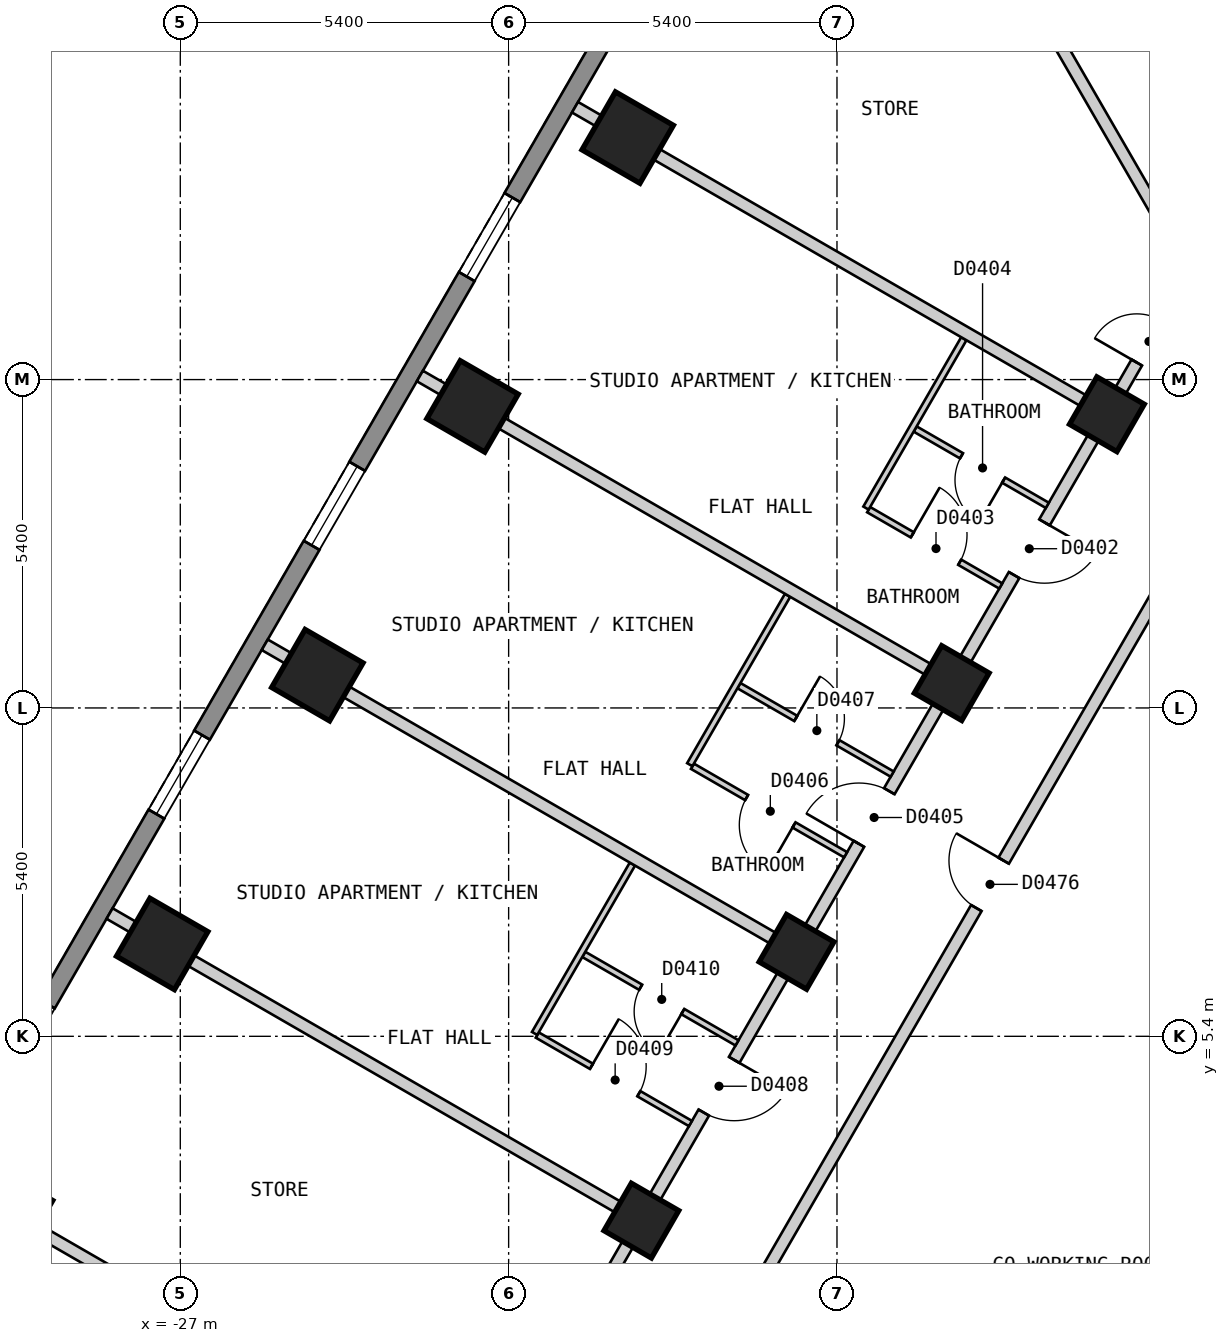
"""IFC4 building model, lengths in metres.
Left out: names, types, materials, properties, quantities, classifications, styles, units other than length and angle.
Written with IfcOpenShell. Run it as: python <this file> out.ifc"""

import sys

from ifc_helpers import new_model, si_unit, direction, frame, frame_2d, origin, origin_2d, place, context, subcontext, project, spatial, polyline, rectangle, outline, extrude, element, fill, save


model = new_model("IFC4")
c1 = context("Model", 3, precision=1e-05, world=origin(), true_north=direction((0.0, 1.0)))
c2 = subcontext(c1, "Body", "Model", "MODEL_VIEW")
j1 = project(units=[si_unit("LENGTHUNIT", "METRE"), si_unit("PLANEANGLEUNIT", "RADIAN")], contexts=[c1])
p1 = place(None, origin())
s1 = spatial("IfcSite", under=j1, at=p1, CompositionType="ELEMENT")
p2 = place(p1, origin())
s2 = spatial("IfcBuilding", under=s1, at=p2, CompositionType="ELEMENT")
p3 = place(p2, frame((0.0, 0.0, 38.4)))
s3 = spatial("IfcBuildingStorey", under=s2, at=p3, CompositionType="ELEMENT", Elevation=38.4)
for number, where, z_axis, x_axis in (
    (1, (-19.642, 20.18, 0.0), (0.0, 0.0, 1.0), (-0.5, -0.866, 0.0)),
    (2, (-22.194, 15.759, 0.0), (0.0, 0.0, 1.0), (-0.5, -0.866, 0.0)),
    (3, (-24.746, 11.339, 0.0), (0.0, 0.0, 1.0), (-0.5, -0.866, 0.0)),
    (4, (-27.298, 6.919, 0.0), (0.0, 0.0, 1.0), (-0.5, -0.866, 0.0)),
    (5, (-29.849, 2.499, 0.0), (0.0, 0.0, 1.0), (-0.5, -0.866, 0.0)),
):
    element("IfcColumn", number, at=place(p3, frame(where, z_axis=z_axis, x_axis=x_axis)), inside=s3, PredefinedType="COLUMN", context=c2, shape_type="SweptSolid", body=[
        extrude(rectangle(XDim=1.1, YDim=1.1, at=origin_2d()), origin(), (0.0, 0.0, 1.0), 3.0),
    ])
for number, where, z_axis, x_axis in (
    (6, (-11.761, 15.63, 0.0), (0.0, 0.0, 1.0), (-0.5, -0.866, 0.0)),
    (7, (-14.313, 11.209, 0.0), (0.0, 0.0, 1.0), (-0.5, -0.866, 0.0)),
    (8, (-16.865, 6.789, 0.0), (0.0, 0.0, 1.0), (-0.5, -0.866, 0.0)),
    (9, (-19.417, 2.369, 0.0), (0.0, 0.0, 1.0), (-0.5, -0.866, 0.0)),
):
    element("IfcColumn", number, at=place(p3, frame(where, z_axis=z_axis, x_axis=x_axis)), inside=s3, PredefinedType="COLUMN", context=c2, shape_type="SweptSolid", body=[
        extrude(rectangle(XDim=0.9, YDim=0.9, at=origin_2d()), origin(), (0.0, 0.0, 1.0), 3.0),
    ])
p4 = place(p3, frame((-17.71, 25.825, 0.0), z_axis=(0.0, 0.0, 1.0), x_axis=(-0.500001938803, -0.866024284413, 0.0)))
e10 = element("IfcWall", 10, at=p4, inside=s3, PredefinedType="SOLIDWALL", context=c2, shape_type="SweptSolid", body=[
    extrude(outline(polyline([(0.0, -0.15), (27.02, -0.15), (26.94, 0.15), (0.08, 0.15), (0.0, -0.15)])), origin(), (0.0, 0.0, 1.0), 2.7),
])
p5 = place(p4, frame((2.553, 0.0, 0.15)))
e11 = element("IfcOpeningElement", 11, at=p5, cuts=e10, PredefinedType="OPENING", context=c2, shape_type="SweptSolid", body=[
    extrude(rectangle(XDim=1.5, YDim=2.1, at=frame_2d((0.75, 1.05))), frame((0.0, 0.16, 0.0), z_axis=(0.0, -1.0, 0.0), x_axis=(1.0, 0.0, 0.0)), (0.0, 0.0, 1.0), 0.32),
])
p6 = place(p4, frame((7.658, 0.0, 0.15)))
e12 = element("IfcOpeningElement", 12, at=p6, cuts=e10, PredefinedType="OPENING", context=c2, shape_type="SweptSolid", body=[
    extrude(rectangle(XDim=1.5, YDim=2.1, at=frame_2d((0.75, 1.05))), frame((0.0, 0.16, 0.0), z_axis=(0.0, -1.0, 0.0), x_axis=(1.0, 0.0, 0.0)), (0.0, 0.0, 1.0), 0.32),
])
p7 = place(p4, frame((12.761, 0.0, 0.15)))
e13 = element("IfcOpeningElement", 13, at=p7, cuts=e10, PredefinedType="OPENING", context=c2, shape_type="SweptSolid", body=[
    extrude(rectangle(XDim=1.5, YDim=2.1, at=frame_2d((0.75, 1.05))), frame((0.0, 0.16, 0.0), z_axis=(0.0, -1.0, 0.0), x_axis=(1.0, 0.0, 0.0)), (0.0, 0.0, 1.0), 0.32),
])
p8 = place(p4, frame((17.865, 0.0, 0.15)))
e14 = element("IfcOpeningElement", 14, at=p8, cuts=e10, PredefinedType="OPENING", context=c2, shape_type="SweptSolid", body=[
    extrude(rectangle(XDim=1.5, YDim=2.1, at=frame_2d((0.75, 1.05))), frame((0.0, 0.16, 0.0), z_axis=(0.0, -1.0, 0.0), x_axis=(1.0, 0.0, 0.0)), (0.0, 0.0, 1.0), 0.32),
])
p9 = place(p4, frame((22.969, 0.0, 0.15)))
e15 = element("IfcOpeningElement", 15, at=p9, cuts=e10, PredefinedType="OPENING", context=c2, shape_type="SweptSolid", body=[
    extrude(rectangle(XDim=1.5, YDim=2.1, at=frame_2d((0.75, 1.05))), frame((0.0, 0.16, 0.0), z_axis=(0.0, -1.0, 0.0), x_axis=(1.0, 0.0, 0.0)), (0.0, 0.0, 1.0), 0.32),
])
p10 = place(p3, frame((-18.244, -0.001, 0.0), z_axis=(0.0, 0.0, 1.0), x_axis=(0.499962999376, 0.866046765051, 0.0)))
e16 = element("IfcWall", 16, at=p10, inside=s3, PredefinedType="PARTITIONING", context=c2, shape_type="SweptSolid", body=[
    extrude(rectangle(XDim=18.245, YDim=0.2, at=frame_2d((9.123, 0.0))), origin(), (0.0, 0.0, 1.0), 2.7),
])
p11 = place(p10, frame((8.672, 0.0, 0.0)))
e17 = element("IfcOpeningElement", 17, at=p11, cuts=e16, PredefinedType="OPENING", context=c2, shape_type="SweptSolid", body=[
    extrude(rectangle(XDim=0.9, YDim=2.1, at=frame_2d((0.45, 1.05))), frame((0.0, 0.11, 0.0), z_axis=(0.0, -1.0, 0.0), x_axis=(1.0, 0.0, 0.0)), (0.0, 0.0, 1.0), 0.22),
])
p12 = place(p3, frame((-20.727, 0.099, 0.0), z_axis=(0.0, 0.0, 1.0), x_axis=(0.499993204491, 0.866029327138, 0.0)))
e18 = element("IfcWall", 18, at=p12, inside=s3, PredefinedType="PARTITIONING", context=c2, shape_type="SweptSolid", body=[
    extrude(rectangle(XDim=20.554, YDim=0.2, at=frame_2d((10.277, 0.0))), origin(), (0.0, 0.0, 1.0), 2.7),
])
p13 = place(p12, frame((18.916, 0.0, 0.0)))
e19 = element("IfcOpeningElement", 19, at=p13, cuts=e18, PredefinedType="OPENING", context=c2, shape_type="SweptSolid", body=[
    extrude(rectangle(XDim=0.8, YDim=2.1, at=frame_2d((0.4, 1.05))), frame((0.0, 0.11, 0.0), z_axis=(0.0, -1.0, 0.0), x_axis=(1.0, 0.0, 0.0)), (0.0, 0.0, 1.0), 0.22),
])
p14 = place(p12, frame((14.88, 0.0, 0.0)))
e20 = element("IfcOpeningElement", 20, at=p14, cuts=e18, PredefinedType="OPENING", context=c2, shape_type="SweptSolid", body=[
    extrude(rectangle(XDim=1.0, YDim=2.1, at=frame_2d((0.5, 1.05))), frame((0.0, 0.11, 0.0), z_axis=(0.0, -1.0, 0.0), x_axis=(1.0, 0.0, 0.0)), (0.0, 0.0, 1.0), 0.22),
])
p15 = place(p12, frame((9.776, 0.0, 0.0)))
e21 = element("IfcOpeningElement", 21, at=p15, cuts=e18, PredefinedType="OPENING", context=c2, shape_type="SweptSolid", body=[
    extrude(rectangle(XDim=1.0, YDim=2.1, at=frame_2d((0.5, 1.05))), frame((0.0, 0.11, 0.0), z_axis=(0.0, -1.0, 0.0), x_axis=(1.0, 0.0, 0.0)), (0.0, 0.0, 1.0), 0.22),
])
p16 = place(p12, frame((4.673, 0.0, 0.0)))
e22 = element("IfcOpeningElement", 22, at=p16, cuts=e18, PredefinedType="OPENING", context=c2, shape_type="SweptSolid", body=[
    extrude(rectangle(XDim=1.0, YDim=2.1, at=frame_2d((0.5, 1.05))), frame((0.0, 0.11, 0.0), z_axis=(0.0, -1.0, 0.0), x_axis=(1.0, 0.0, 0.0)), (0.0, 0.0, 1.0), 0.22),
])
p17 = place(p12, frame((0.838, 0.0, 0.0)))
e23 = element("IfcOpeningElement", 23, at=p17, cuts=e18, PredefinedType="OPENING", context=c2, shape_type="SweptSolid", body=[
    extrude(rectangle(XDim=0.8, YDim=2.1, at=frame_2d((0.4, 1.05))), frame((0.0, 0.11, 0.0), z_axis=(0.0, -1.0, 0.0), x_axis=(1.0, 0.0, 0.0)), (0.0, 0.0, 1.0), 0.22),
])
p18 = place(p3, frame((-20.364, 6.747, 0.0), z_axis=(0.0, 0.0, 1.0), x_axis=(0.866003949776, -0.500037157592, 0.0)))
e24 = element("IfcWall", 24, at=p18, inside=s3, PredefinedType="PARTITIONING", context=c2, shape_type="SweptSolid", body=[
    extrude(rectangle(XDim=2.91, YDim=0.1, at=frame_2d((1.455, 0.0))), origin(), (0.0, 0.0, 1.0), 2.7),
])
p19 = place(p18, frame((1.08, 0.0, 0.0)))
e25 = element("IfcOpeningElement", 25, at=p19, cuts=e24, PredefinedType="OPENING", context=c2, shape_type="SweptSolid", body=[
    extrude(rectangle(XDim=0.8, YDim=2.1, at=frame_2d((0.4, 1.05))), frame((0.0, 0.06, 0.0), z_axis=(0.0, -1.0, 0.0), x_axis=(1.0, 0.0, 0.0)), (0.0, 0.0, 1.0), 0.12),
])
p20 = place(p3, frame((-21.129, 5.421, 0.0), z_axis=(0.0, 0.0, 1.0), x_axis=(0.865935355752, -0.500155935342, 0.0)))
e26 = element("IfcWall", 26, at=p20, inside=s3, PredefinedType="PARTITIONING", context=c2, shape_type="SweptSolid", body=[
    extrude(rectangle(XDim=2.909, YDim=0.1, at=frame_2d((1.454, 0.0))), origin(), (0.0, 0.0, 1.0), 2.7),
])
p21 = place(p20, frame((1.029, 0.0, 0.0)))
e27 = element("IfcOpeningElement", 27, at=p21, cuts=e26, PredefinedType="OPENING", context=c2, shape_type="SweptSolid", body=[
    extrude(rectangle(XDim=0.9, YDim=2.1, at=frame_2d((0.45, 1.05))), frame((0.0, 0.06, 0.0), z_axis=(0.0, -1.0, 0.0), x_axis=(1.0, 0.0, 0.0)), (0.0, 0.0, 1.0), 0.12),
])
p22 = place(p3, frame((-18.577, 9.841, 0.0), z_axis=(0.0, 0.0, 1.0), x_axis=(0.865899003441, -0.500218867937, 0.0)))
e28 = element("IfcWall", 28, at=p22, inside=s3, PredefinedType="PARTITIONING", context=c2, shape_type="SweptSolid", body=[
    extrude(rectangle(XDim=2.909, YDim=0.1, at=frame_2d((1.455, 0.0))), origin(), (0.0, 0.0, 1.0), 2.7),
])
p23 = place(p22, frame((1.029, 0.0, 0.0)))
e29 = element("IfcOpeningElement", 29, at=p23, cuts=e28, PredefinedType="OPENING", context=c2, shape_type="SweptSolid", body=[
    extrude(rectangle(XDim=0.9, YDim=2.1, at=frame_2d((0.45, 1.05))), frame((0.0, 0.06, 0.0), z_axis=(0.0, -1.0, 0.0), x_axis=(1.0, 0.0, 0.0)), (0.0, 0.0, 1.0), 0.12),
])
p24 = place(p3, frame((-15.679, 14.061, 0.0), z_axis=(0.0, 0.0, 1.0), x_axis=(0.865916579361, -0.500188442078, 0.0)))
e30 = element("IfcWall", 30, at=p24, inside=s3, PredefinedType="PARTITIONING", context=c2, shape_type="SweptSolid", body=[
    extrude(rectangle(XDim=2.509, YDim=0.1, at=frame_2d((1.255, 0.0))), origin(), (0.0, 0.0, 1.0), 2.7),
])
p25 = place(p24, frame((0.829, 0.0, 0.0)))
e31 = element("IfcOpeningElement", 31, at=p25, cuts=e30, PredefinedType="OPENING", context=c2, shape_type="SweptSolid", body=[
    extrude(rectangle(XDim=0.9, YDim=2.1, at=frame_2d((0.45, 1.05))), frame((0.0, 0.06, 0.0), z_axis=(0.0, -1.0, 0.0), x_axis=(1.0, 0.0, 0.0)), (0.0, 0.0, 1.0), 0.12),
])
p26 = place(p3, frame((-14.914, 15.387, 0.0), z_axis=(0.0, 0.0, 1.0), x_axis=(0.865983051302, -0.500073349477, 0.0)))
e32 = element("IfcWall", 32, at=p26, inside=s3, PredefinedType="PARTITIONING", context=c2, shape_type="SweptSolid", body=[
    extrude(rectangle(XDim=2.509, YDim=0.1, at=frame_2d((1.255, 0.0))), origin(), (0.0, 0.0, 1.0), 2.7),
])
p27 = place(p26, frame((0.88, 0.0, 0.0)))
e33 = element("IfcOpeningElement", 33, at=p27, cuts=e32, PredefinedType="OPENING", context=c2, shape_type="SweptSolid", body=[
    extrude(rectangle(XDim=0.8, YDim=2.1, at=frame_2d((0.4, 1.05))), frame((0.0, 0.06, 0.0), z_axis=(0.0, -1.0, 0.0), x_axis=(1.0, 0.0, 0.0)), (0.0, 0.0, 1.0), 0.12),
])
p28 = place(p3, frame((-17.813, 11.167, 0.0), z_axis=(0.0, 0.0, 1.0), x_axis=(0.866087824531, -0.499891868507, 0.0)))
e34 = element("IfcWall", 34, at=p28, inside=s3, PredefinedType="PARTITIONING", context=c2, shape_type="SweptSolid", body=[
    extrude(rectangle(XDim=2.911, YDim=0.1, at=frame_2d((1.456, 0.0))), origin(), (0.0, 0.0, 1.0), 2.7),
])
p29 = place(p28, frame((1.08, 0.0, 0.0)))
e35 = element("IfcOpeningElement", 35, at=p29, cuts=e34, PredefinedType="OPENING", context=c2, shape_type="SweptSolid", body=[
    extrude(rectangle(XDim=0.8, YDim=2.1, at=frame_2d((0.4, 1.05))), frame((0.0, 0.06, 0.0), z_axis=(0.0, -1.0, 0.0), x_axis=(1.0, 0.0, 0.0)), (0.0, 0.0, 1.0), 0.12),
])
p30 = place(p3, frame((-15.723, 14.087, 0.0), z_axis=(0.0, 0.0, 1.0), x_axis=(0.500204249835, 0.865907447969, 0.0)))
e36 = element("IfcWall", 36, at=p30, inside=s3, PredefinedType="PARTITIONING", context=c2, shape_type="SweptSolid", body=[
    extrude(rectangle(XDim=3.217, YDim=0.1, at=frame_2d((1.608, 0.0))), origin(), (0.0, 0.0, 1.0), 2.7),
])
p31 = place(p3, frame((-21.173, 5.447, 0.0), z_axis=(0.0, 0.0, 1.0), x_axis=(0.500162542782, 0.865931539325, 0.0)))
e37 = element("IfcWall", 37, at=p31, inside=s3, PredefinedType="PARTITIONING", context=c2, shape_type="SweptSolid", body=[
    extrude(rectangle(XDim=3.217, YDim=0.1, at=frame_2d((1.609, 0.0))), origin(), (0.0, 0.0, 1.0), 2.7),
])
p32 = place(p3, frame((-18.621, 9.867, 0.0), z_axis=(0.0, 0.0, 1.0), x_axis=(0.500197891286, 0.865911121047, 0.0)))
e38 = element("IfcWall", 38, at=p32, inside=s3, PredefinedType="PARTITIONING", context=c2, shape_type="SweptSolid", body=[
    extrude(rectangle(XDim=3.215, YDim=0.1, at=frame_2d((1.607, 0.0))), origin(), (0.0, 0.0, 1.0), 2.7),
])
p33 = place(p3, frame((-12.659, 21.926, 0.0), z_axis=(0.0, 0.0, 1.0), x_axis=(0.500025458316, -0.86601070492, 0.0)))
e39 = element("IfcWall", 39, at=p33, inside=s3, PredefinedType="PARTITIONING", context=c2, shape_type="SweptSolid", body=[
    extrude(rectangle(XDim=4.533, YDim=0.2, at=frame_2d((2.267, 0.0))), origin(), (0.0, 0.0, 1.0), 2.7),
])
p34 = place(p3, frame((-28.163, 7.419, 0.0), z_axis=(0.0, 0.0, 1.0), x_axis=(0.866022959057, -0.500004234368, 0.0)))
e40 = element("IfcWall", 40, at=p34, inside=s3, PredefinedType="PARTITIONING", context=c2, shape_type="SweptSolid", body=[
    extrude(rectangle(XDim=10.0, YDim=0.2, at=frame_2d((5.0, 0.0))), origin(), (0.0, 0.0, 1.0), 2.7),
])
p35 = place(p3, frame((-30.716, 2.999, 0.0), z_axis=(0.0, 0.0, 1.0), x_axis=(0.866032775405, -0.499987231761, 0.0)))
e41 = element("IfcWall", 41, at=p35, inside=s3, PredefinedType="PARTITIONING", context=c2, shape_type="SweptSolid", body=[
    extrude(rectangle(XDim=5.8, YDim=0.2, at=frame_2d((2.9, 0.0))), origin(), (0.0, 0.0, 1.0), 2.7),
])
p36 = place(p3, frame((-25.611, 11.839, 0.0), z_axis=(0.0, 0.0, 1.0), x_axis=(0.866022959057, -0.500004234368, 0.0)))
e42 = element("IfcWall", 42, at=p36, inside=s3, PredefinedType="PARTITIONING", context=c2, shape_type="SweptSolid", body=[
    extrude(rectangle(XDim=10.0, YDim=0.2, at=frame_2d((5.0, 0.0))), origin(), (0.0, 0.0, 1.0), 2.7),
])
for number, where, z_axis, x_axis in (
    (43, (-20.508, 20.679, 0.0), (0.0, 0.0, 1.0), (0.866, -0.5, 0.0)),
    (44, (-23.06, 16.259, 0.0), (0.0, 0.0, 1.0), (0.866, -0.5, 0.0)),
):
    element("IfcWall", number, at=place(p3, frame(where, z_axis=z_axis, x_axis=x_axis)), inside=s3, PredefinedType="PARTITIONING", context=c2, shape_type="SweptSolid", body=[
        extrude(rectangle(XDim=10.001, YDim=0.2, at=frame_2d((5.0, 0.0))), origin(), (0.0, 0.0, 1.0), 2.7),
    ])
p37 = place(p6, origin())
e45 = element("IfcWindow", 45, at=p37, inside=s3, PartitioningType="SINGLE_PANEL", PredefinedType="WINDOW", context=c2, shape_type="SweptSolid", body=[
    extrude(rectangle(XDim=1.5, YDim=2.1, at=frame_2d((0.75, 1.05))), frame((0.0, 0.03, 0.0), z_axis=(0.0, -1.0, 0.0), x_axis=(1.0, 0.0, 0.0)), (0.0, 0.0, 1.0), 0.06),
])
fill(e12, e45)
p38 = place(p7, origin())
e46 = element("IfcWindow", 46, at=p38, inside=s3, PartitioningType="SINGLE_PANEL", PredefinedType="WINDOW", context=c2, shape_type="SweptSolid", body=[
    extrude(rectangle(XDim=1.5, YDim=2.1, at=frame_2d((0.75, 1.05))), frame((0.0, 0.03, 0.0), z_axis=(0.0, -1.0, 0.0), x_axis=(1.0, 0.0, 0.0)), (0.0, 0.0, 1.0), 0.06),
])
fill(e13, e46)
p39 = place(p8, origin())
e47 = element("IfcWindow", 47, at=p39, inside=s3, PartitioningType="SINGLE_PANEL", PredefinedType="WINDOW", context=c2, shape_type="SweptSolid", body=[
    extrude(rectangle(XDim=1.5, YDim=2.1, at=frame_2d((0.75, 1.05))), frame((0.0, 0.03, 0.0), z_axis=(0.0, -1.0, 0.0), x_axis=(1.0, 0.0, 0.0)), (0.0, 0.0, 1.0), 0.06),
])
fill(e14, e47)
p40 = place(p13, origin())
e48 = element("IfcDoor", 48, at=p40, inside=s3, OperationType="SINGLE_SWING_LEFT", PredefinedType="DOOR", context=c2, shape_type="SweptSolid", body=[
    extrude(rectangle(XDim=0.8, YDim=2.1, at=frame_2d((0.4, 1.05))), frame((0.0, 0.025, 0.0), z_axis=(0.0, -1.0, 0.0), x_axis=(1.0, 0.0, 0.0)), (0.0, 0.0, 1.0), 0.05),
])
fill(e19, e48)
p41 = place(p14, origin())
e49 = element("IfcDoor", 49, at=p41, inside=s3, OperationType="SINGLE_SWING_RIGHT", PredefinedType="DOOR", context=c2, shape_type="SweptSolid", body=[
    extrude(rectangle(XDim=1.0, YDim=2.1, at=frame_2d((0.5, 1.05))), frame((0.0, 0.025, 0.0), z_axis=(0.0, -1.0, 0.0), x_axis=(1.0, 0.0, 0.0)), (0.0, 0.0, 1.0), 0.05),
])
fill(e20, e49)
p42 = place(p25, origin())
e50 = element("IfcDoor", 50, at=p42, inside=s3, OperationType="SINGLE_SWING_LEFT", PredefinedType="DOOR", context=c2, shape_type="SweptSolid", body=[
    extrude(rectangle(XDim=0.9, YDim=2.1, at=frame_2d((0.45, 1.05))), frame((0.0, 0.025, 0.0), z_axis=(0.0, -1.0, 0.0), x_axis=(1.0, 0.0, 0.0)), (0.0, 0.0, 1.0), 0.05),
])
fill(e31, e50)
p43 = place(p27, origin())
e51 = element("IfcDoor", 51, at=p43, inside=s3, OperationType="SINGLE_SWING_RIGHT", PredefinedType="DOOR", context=c2, shape_type="SweptSolid", body=[
    extrude(rectangle(XDim=0.8, YDim=2.1, at=frame_2d((0.4, 1.05))), frame((0.0, 0.025, 0.0), z_axis=(0.0, -1.0, 0.0), x_axis=(1.0, 0.0, 0.0)), (0.0, 0.0, 1.0), 0.05),
])
fill(e33, e51)
p44 = place(p15, origin())
e52 = element("IfcDoor", 52, at=p44, inside=s3, OperationType="SINGLE_SWING_LEFT", PredefinedType="DOOR", context=c2, shape_type="SweptSolid", body=[
    extrude(rectangle(XDim=1.0, YDim=2.1, at=frame_2d((0.5, 1.05))), frame((0.0, 0.025, 0.0), z_axis=(0.0, -1.0, 0.0), x_axis=(1.0, 0.0, 0.0)), (0.0, 0.0, 1.0), 0.05),
])
fill(e21, e52)
p45 = place(p23, origin())
e53 = element("IfcDoor", 53, at=p45, inside=s3, OperationType="SINGLE_SWING_RIGHT", PredefinedType="DOOR", context=c2, shape_type="SweptSolid", body=[
    extrude(rectangle(XDim=0.9, YDim=2.1, at=frame_2d((0.45, 1.05))), frame((0.0, 0.025, 0.0), z_axis=(0.0, -1.0, 0.0), x_axis=(1.0, 0.0, 0.0)), (0.0, 0.0, 1.0), 0.05),
])
fill(e29, e53)
p46 = place(p29, origin())
e54 = element("IfcDoor", 54, at=p46, inside=s3, OperationType="SINGLE_SWING_LEFT", PredefinedType="DOOR", context=c2, shape_type="SweptSolid", body=[
    extrude(rectangle(XDim=0.8, YDim=2.1, at=frame_2d((0.4, 1.05))), frame((0.0, 0.025, 0.0), z_axis=(0.0, -1.0, 0.0), x_axis=(1.0, 0.0, 0.0)), (0.0, 0.0, 1.0), 0.05),
])
fill(e35, e54)
p47 = place(p16, origin())
e55 = element("IfcDoor", 55, at=p47, inside=s3, OperationType="SINGLE_SWING_RIGHT", PredefinedType="DOOR", context=c2, shape_type="SweptSolid", body=[
    extrude(rectangle(XDim=1.0, YDim=2.1, at=frame_2d((0.5, 1.05))), frame((0.0, 0.025, 0.0), z_axis=(0.0, -1.0, 0.0), x_axis=(1.0, 0.0, 0.0)), (0.0, 0.0, 1.0), 0.05),
])
fill(e22, e55)
p48 = place(p21, origin())
e56 = element("IfcDoor", 56, at=p48, inside=s3, OperationType="SINGLE_SWING_LEFT", PredefinedType="DOOR", context=c2, shape_type="SweptSolid", body=[
    extrude(rectangle(XDim=0.9, YDim=2.1, at=frame_2d((0.45, 1.05))), frame((0.0, 0.025, 0.0), z_axis=(0.0, -1.0, 0.0), x_axis=(1.0, 0.0, 0.0)), (0.0, 0.0, 1.0), 0.05),
])
fill(e27, e56)
p49 = place(p19, origin())
e57 = element("IfcDoor", 57, at=p49, inside=s3, OperationType="SINGLE_SWING_RIGHT", PredefinedType="DOOR", context=c2, shape_type="SweptSolid", body=[
    extrude(rectangle(XDim=0.8, YDim=2.1, at=frame_2d((0.4, 1.05))), frame((0.0, 0.025, 0.0), z_axis=(0.0, -1.0, 0.0), x_axis=(1.0, 0.0, 0.0)), (0.0, 0.0, 1.0), 0.05),
])
fill(e25, e57)
p50 = place(p11, origin())
e58 = element("IfcDoor", 58, at=p50, inside=s3, OperationType="SINGLE_SWING_RIGHT", PredefinedType="DOOR", context=c2, shape_type="SweptSolid", body=[
    extrude(rectangle(XDim=0.9, YDim=2.1, at=frame_2d((0.45, 1.05))), frame((0.0, 0.025, 0.0), z_axis=(0.0, -1.0, 0.0), x_axis=(1.0, 0.0, 0.0)), (0.0, 0.0, 1.0), 0.05),
])
fill(e17, e58)
save(model, sys.argv[1])
